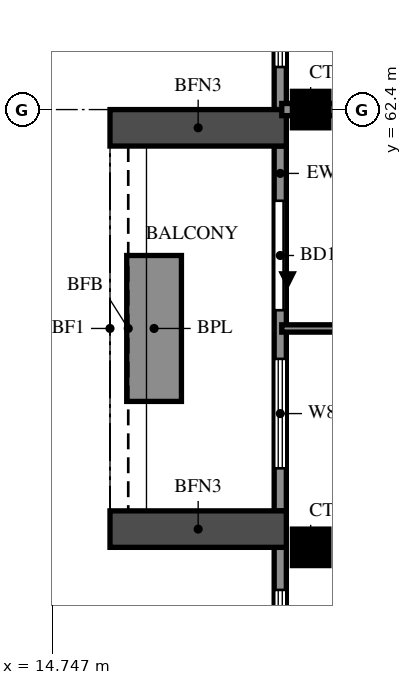
"""IFC4 building model, lengths in metres.
Left out: names, types, materials, properties, quantities, classifications, styles, units other than length and angle.
Written with IfcOpenShell. Run it as: python <this file> out.ifc"""

import sys

from ifc_helpers import new_model, si_unit, direction, frame, frame_2d, origin, origin_2d, place, context, subcontext, project, spatial, rectangle, extrude, source, transform, mapped, element, fill, save


model = new_model("IFC4")
c1 = context("Model", 3, precision=1e-05, world=origin(), true_north=direction((0.0, 1.0)))
c2 = subcontext(c1, "Body", "Model", "MODEL_VIEW")
j1 = project(units=[si_unit("LENGTHUNIT", "METRE"), si_unit("PLANEANGLEUNIT", "RADIAN")], contexts=[c1])
p1 = place(None, origin())
s1 = spatial("IfcSite", under=j1, at=p1, CompositionType="ELEMENT")
p2 = place(p1, origin())
s2 = spatial("IfcBuilding", under=s1, at=p2, CompositionType="ELEMENT")
p3 = place(p2, frame((0.0, 0.0, 264.0)))
s3 = spatial("IfcBuildingStorey", under=s2, at=p3, CompositionType="ELEMENT", Elevation=264.0)
m1 = source(origin(), c2, "Body", "SweptSolid", [
    extrude(rectangle(XDim=0.6, YDim=0.6, at=origin_2d()), origin(), (0.0, 0.0, 1.0), 3.22),
])
for number, where, z_axis, x_axis in (
    (1, (19.0, 55.2, 0.0), (0.0, 0.0, 1.0), (1.0, 0.0, 0.0)),
    (2, (19.0, 62.4, 0.0), (0.0, 0.0, 1.0), (1.0, 0.0, 0.0)),
):
    element("IfcColumn", number, at=place(p3, frame(where, z_axis=z_axis, x_axis=x_axis)), inside=s3, PredefinedType="COLUMN", context=c2, shape_type="MappedRepresentation", body=[
        mapped(m1, transform((0.0, 0.0, 0.0))),
    ])
p4 = place(p3, frame((18.5, 76.6, 0.0), z_axis=(0.0, 0.0, 1.0), x_axis=(0.0, -1.0, 0.0)))
e3 = element("IfcWall", 3, at=p4, inside=s3, PredefinedType="SOLIDWALL", context=c2, shape_type="SweptSolid", body=[
    extrude(rectangle(XDim=14.2, YDim=0.2, at=frame_2d((7.1, 0.0))), origin(), (0.0, 0.0, 1.0), 3.22),
])
p5 = place(p4, frame((11.1, 0.0, 0.6)))
e4 = element("IfcOpeningElement", 4, at=p5, cuts=e3, PredefinedType="OPENING", context=c2, shape_type="SweptSolid", body=[
    extrude(rectangle(XDim=2.4, YDim=2.4, at=frame_2d((1.2, 1.2))), frame((0.0, 0.11, 0.0), z_axis=(0.0, -1.0, 0.0), x_axis=(1.0, 0.0, 0.0)), (0.0, 0.0, 1.0), 0.22),
])
p6 = place(p4, frame((7.6, 0.0, 0.6)))
e5 = element("IfcOpeningElement", 5, at=p6, cuts=e3, PredefinedType="OPENING", context=c2, shape_type="SweptSolid", body=[
    extrude(rectangle(XDim=2.4, YDim=2.4, at=frame_2d((1.2, 1.2))), frame((0.0, 0.11, 0.0), z_axis=(0.0, -1.0, 0.0), x_axis=(1.0, 0.0, 0.0)), (0.0, 0.0, 1.0), 0.22),
])
p7 = place(p4, frame((4.75, 0.0, 1.5)))
e6 = element("IfcOpeningElement", 6, at=p7, cuts=e3, PredefinedType="OPENING", context=c2, shape_type="SweptSolid", body=[
    extrude(rectangle(XDim=0.9, YDim=0.9, at=frame_2d((0.45, 0.45))), frame((0.0, 0.11, 0.0), z_axis=(0.0, -1.0, 0.0), x_axis=(1.0, 0.0, 0.0)), (0.0, 0.0, 1.0), 0.22),
])
p8 = place(p4, frame((0.6, 0.0, 0.6)))
e7 = element("IfcOpeningElement", 7, at=p8, cuts=e3, PredefinedType="OPENING", context=c2, shape_type="SweptSolid", body=[
    extrude(rectangle(XDim=2.4, YDim=2.4, at=frame_2d((1.2, 1.2))), frame((0.0, 0.11, 0.0), z_axis=(0.0, -1.0, 0.0), x_axis=(1.0, 0.0, 0.0)), (0.0, 0.0, 1.0), 0.22),
])
p9 = place(p3, frame((18.5, 61.8, 0.0), z_axis=(0.0, 0.0, 1.0), x_axis=(0.0, -1.0, 0.0)))
e8 = element("IfcWall", 8, at=p9, inside=s3, PredefinedType="SOLIDWALL", context=c2, shape_type="SweptSolid", body=[
    extrude(rectangle(XDim=6.0, YDim=0.2, at=frame_2d((3.0, 0.0))), origin(), (0.0, 0.0, 1.0), 3.22),
])
p10 = place(p9, frame((0.9, 0.0, 0.0)))
e9 = element("IfcOpeningElement", 9, at=p10, cuts=e8, PredefinedType="OPENING", context=c2, shape_type="SweptSolid", body=[
    extrude(rectangle(XDim=1.8, YDim=2.4, at=frame_2d((0.9, 1.2))), frame((0.0, 0.11, 0.0), z_axis=(0.0, -1.0, 0.0), x_axis=(1.0, 0.0, 0.0)), (0.0, 0.0, 1.0), 0.22),
])
p11 = place(p9, frame((3.5, 0.0, 0.6)))
e10 = element("IfcOpeningElement", 10, at=p11, cuts=e8, PredefinedType="OPENING", context=c2, shape_type="SweptSolid", body=[
    extrude(rectangle(XDim=1.8, YDim=2.4, at=frame_2d((0.9, 1.2))), frame((0.0, 0.11, 0.0), z_axis=(0.0, -1.0, 0.0), x_axis=(1.0, 0.0, 0.0)), (0.0, 0.0, 1.0), 0.22),
])
p12 = place(p3, frame((18.5, 55.2, 0.0), z_axis=(0.0, 0.0, 1.0), x_axis=(0.0, -1.0, 0.0)))
e11 = element("IfcWall", 11, at=p12, inside=s3, PredefinedType="SOLIDWALL", context=c2, shape_type="SweptSolid", body=[
    extrude(rectangle(XDim=12.0, YDim=0.2, at=frame_2d((6.0, 0.0))), origin(), (0.0, 0.0, 1.0), 3.22),
])
p13 = place(p12, frame((8.3, 0.0, 0.6)))
e12 = element("IfcOpeningElement", 12, at=p13, cuts=e11, PredefinedType="OPENING", context=c2, shape_type="SweptSolid", body=[
    extrude(rectangle(XDim=2.4, YDim=2.4, at=frame_2d((1.2, 1.2))), frame((0.0, 0.11, 0.0), z_axis=(0.0, -1.0, 0.0), x_axis=(1.0, 0.0, 0.0)), (0.0, 0.0, 1.0), 0.22),
])
p14 = place(p12, frame((4.2, 0.0, 0.6)))
e13 = element("IfcOpeningElement", 13, at=p14, cuts=e11, PredefinedType="OPENING", context=c2, shape_type="SweptSolid", body=[
    extrude(rectangle(XDim=2.4, YDim=2.4, at=frame_2d((1.2, 1.2))), frame((0.0, 0.11, 0.0), z_axis=(0.0, -1.0, 0.0), x_axis=(1.0, 0.0, 0.0)), (0.0, 0.0, 1.0), 0.22),
])
p15 = place(p12, frame((0.7, 0.0, 0.6)))
e14 = element("IfcOpeningElement", 14, at=p15, cuts=e11, PredefinedType="OPENING", context=c2, shape_type="SweptSolid", body=[
    extrude(rectangle(XDim=2.4, YDim=2.4, at=frame_2d((1.2, 1.2))), frame((0.0, 0.11, 0.0), z_axis=(0.0, -1.0, 0.0), x_axis=(1.0, 0.0, 0.0)), (0.0, 0.0, 1.0), 0.22),
])
for number, where, z_axis, x_axis in (
    (15, (18.6, 62.1, 0.0), (0.0, 0.0, 1.0), (-1.0, 0.0, 0.0)),
    (16, (18.6, 55.5, 0.0), (0.0, 0.0, 1.0), (-1.0, 0.0, 0.0)),
):
    element("IfcWall", number, at=place(p3, frame(where, z_axis=z_axis, x_axis=x_axis)), inside=s3, PredefinedType="SOLIDWALL", context=c2, shape_type="SweptSolid", body=[
        extrude(rectangle(XDim=2.9, YDim=0.6, at=frame_2d((1.45, 0.0))), origin(), (0.0, 0.0, 1.0), 2.85),
    ])
p16 = place(p3, frame((16.425, 60.0, 0.0), z_axis=(0.0, 0.0, 1.0), x_axis=(0.0, -1.0, 0.0)))
e17 = element("IfcWall", 17, at=p16, inside=s3, PredefinedType="SOLIDWALL", context=c2, shape_type="SweptSolid", body=[
    extrude(rectangle(XDim=2.4, YDim=0.9, at=frame_2d((1.2, 0.0))), origin(), (0.0, 0.0, 1.0), 0.9),
])
p17 = place(p3, frame((18.525, 62.4, 0.0), z_axis=(0.0, 0.0, 1.0), x_axis=(1.0, 0.0, 0.0)))
e18 = element("IfcWall", 18, at=p17, inside=s3, PredefinedType="SOLIDWALL", context=c2, shape_type="SweptSolid", body=[
    extrude(rectangle(XDim=7.875, YDim=0.2, at=frame_2d((3.938, 0.0))), origin(), (0.0, 0.0, 1.0), 3.22),
])
p18 = place(p3, frame((18.525, 58.8, 0.0), z_axis=(0.0, 0.0, 1.0), x_axis=(1.0, 0.0, 0.0)))
e19 = element("IfcWall", 19, at=p18, inside=s3, PredefinedType="PARTITIONING", context=c2, shape_type="SweptSolid", body=[
    extrude(rectangle(XDim=4.675, YDim=0.12, at=frame_2d((2.337, 0.0))), origin(), (0.0, 0.0, 1.0), 2.32),
])
p19 = place(p5, origin())
e20 = element("IfcWindow", 20, at=p19, inside=s3, PartitioningType="DOUBLE_PANEL_VERTICAL", PredefinedType="WINDOW", context=c2, shape_type="SweptSolid", body=[
    extrude(rectangle(XDim=2.4, YDim=2.4, at=frame_2d((1.2, 1.2))), frame((0.0, 0.03, 0.0), z_axis=(0.0, -1.0, 0.0), x_axis=(1.0, 0.0, 0.0)), (0.0, 0.0, 1.0), 0.06),
])
fill(e4, e20)
p20 = place(p10, origin())
e21 = element("IfcDoor", 21, at=p20, inside=s3, OperationType="DOUBLE_DOOR_SLIDING", PredefinedType="DOOR", context=c2, shape_type="SweptSolid", body=[
    extrude(rectangle(XDim=1.8, YDim=2.4, at=frame_2d((0.9, 1.2))), frame((0.0, 0.025, 0.0), z_axis=(0.0, -1.0, 0.0), x_axis=(1.0, 0.0, 0.0)), (0.0, 0.0, 1.0), 0.05),
])
fill(e9, e21)
p21 = place(p11, origin())
e22 = element("IfcWindow", 22, at=p21, inside=s3, PartitioningType="DOUBLE_PANEL_VERTICAL", PredefinedType="WINDOW", context=c2, shape_type="SweptSolid", body=[
    extrude(rectangle(XDim=1.8, YDim=2.4, at=frame_2d((0.9, 1.2))), frame((0.0, 0.03, 0.0), z_axis=(0.0, -1.0, 0.0), x_axis=(1.0, 0.0, 0.0)), (0.0, 0.0, 1.0), 0.06),
])
fill(e10, e22)
p22 = place(p15, origin())
e23 = element("IfcWindow", 23, at=p22, inside=s3, PartitioningType="DOUBLE_PANEL_VERTICAL", PredefinedType="WINDOW", context=c2, shape_type="SweptSolid", body=[
    extrude(rectangle(XDim=2.4, YDim=2.4, at=frame_2d((1.2, 1.2))), frame((0.0, 0.03, 0.0), z_axis=(0.0, -1.0, 0.0), x_axis=(1.0, 0.0, 0.0)), (0.0, 0.0, 1.0), 0.06),
])
fill(e14, e23)
save(model, sys.argv[1])
